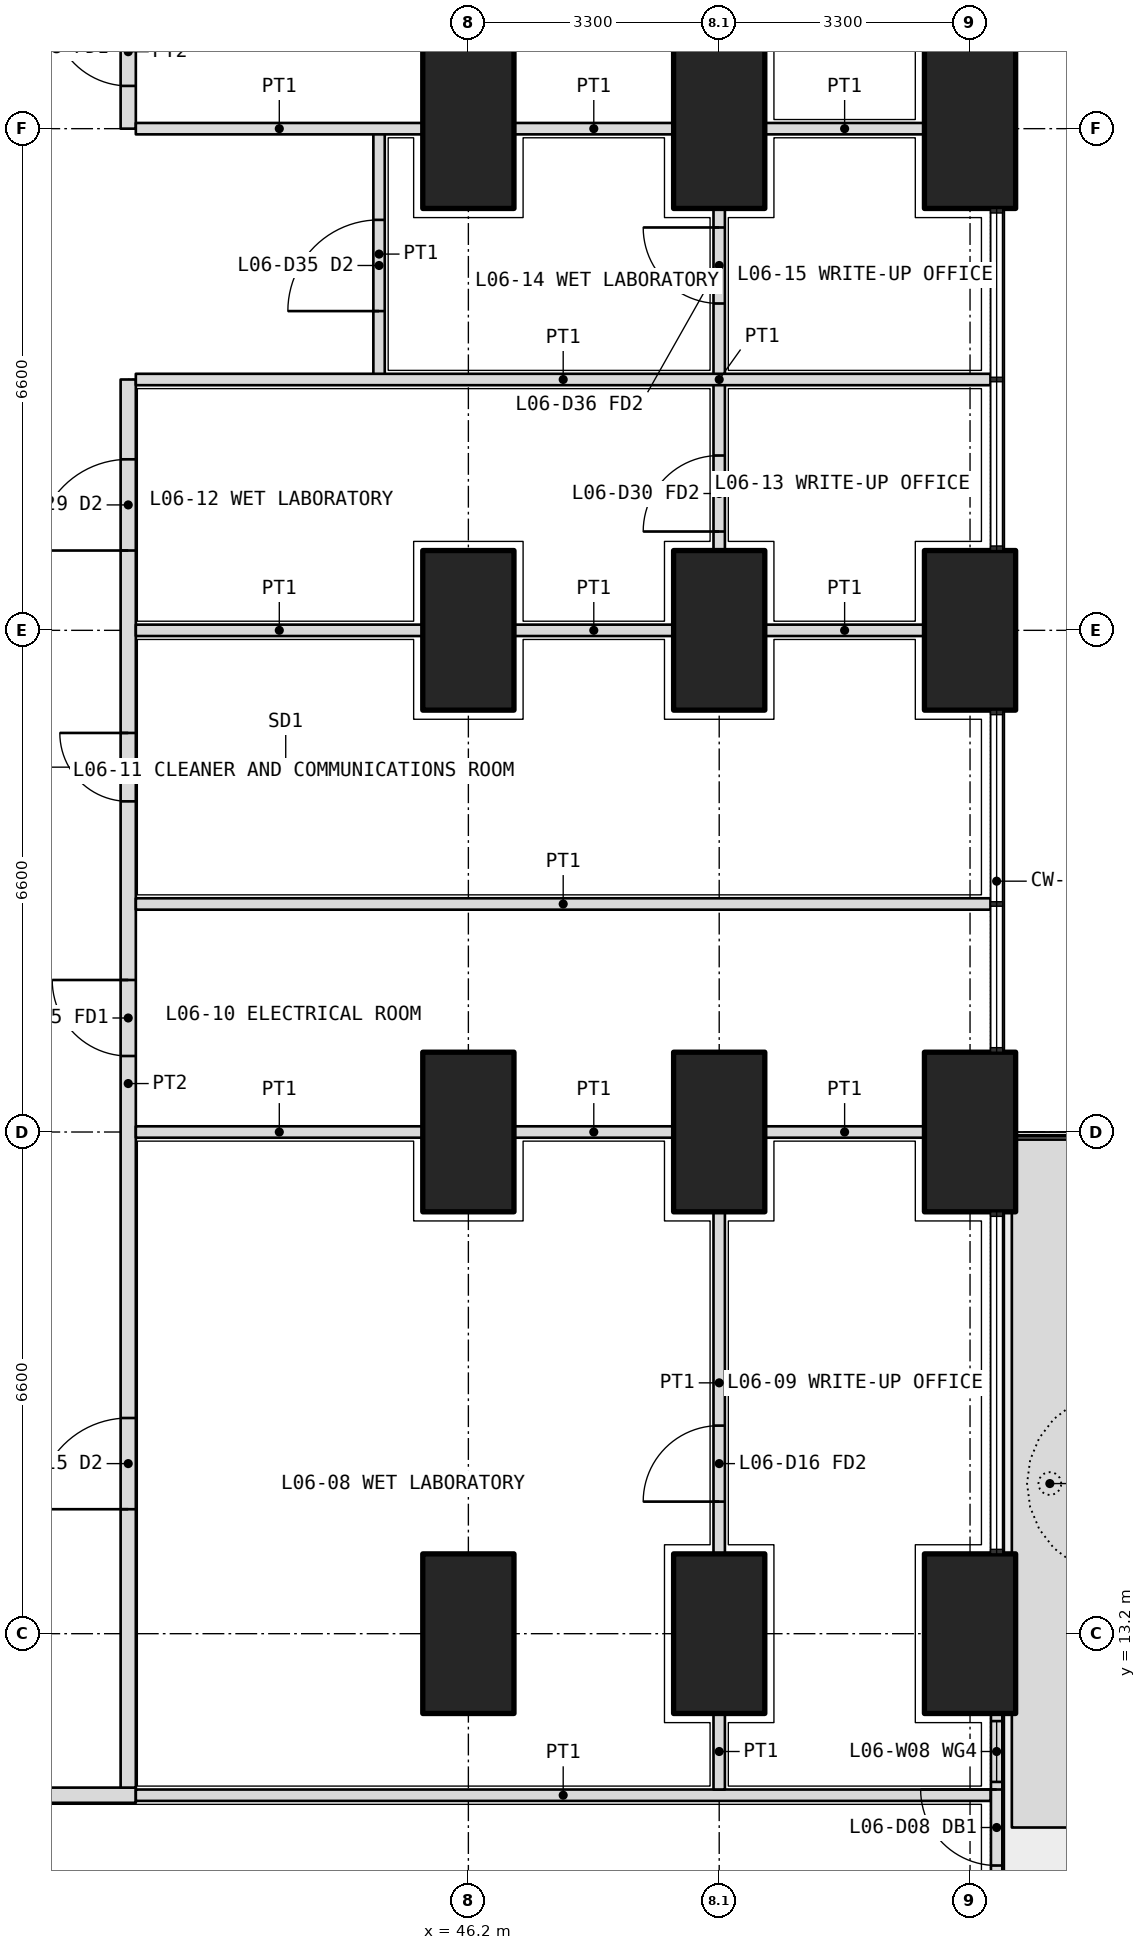
"""IFC4 building model, lengths in metres.
Left out: names, types, materials, properties, quantities, classifications, styles, units other than length and angle.
Written with IfcOpenShell. Run it as: python <this file> out.ifc"""

import sys

from ifc_helpers import new_model, si_unit, direction, frame, frame_2d, origin, origin_2d, place, context, subcontext, project, spatial, polyline, rectangle, outline, extrude, element, fill, save


model = new_model("IFC4")
c1 = context("Model", 3, precision=1e-05, world=origin(), true_north=direction((0.0, 1.0)))
c2 = subcontext(c1, "Body", "Model", "MODEL_VIEW")
j1 = project(units=[si_unit("LENGTHUNIT", "METRE"), si_unit("PLANEANGLEUNIT", "RADIAN")], contexts=[c1])
p1 = place(None, origin())
s1 = spatial("IfcSite", under=j1, at=p1, CompositionType="ELEMENT")
p2 = place(p1, origin())
s2 = spatial("IfcBuilding", under=s1, at=p2, CompositionType="ELEMENT")
p3 = place(p2, frame((0.0, 0.0, 29.7)))
s3 = spatial("IfcBuildingStorey", under=s2, at=p3, CompositionType="ELEMENT", Elevation=29.7)
for number, where, z_axis, x_axis in (
    (1, (52.8, 13.2, 0.0), (0.0, 0.0, 1.0), (0.0, 1.0, 0.0)),
    (2, (52.8, 19.8, 0.0), (0.0, 0.0, 1.0), (0.0, 1.0, 0.0)),
    (3, (52.8, 26.4, 0.0), (0.0, 0.0, 1.0), (0.0, 1.0, 0.0)),
    (4, (52.8, 33.0, 0.0), (0.0, 0.0, 1.0), (0.0, 1.0, 0.0)),
    (5, (49.5, 13.2, 0.0), (0.0, 0.0, 1.0), (0.0, 1.0, 0.0)),
    (6, (49.5, 19.8, 0.0), (0.0, 0.0, 1.0), (0.0, 1.0, 0.0)),
    (7, (49.5, 26.4, 0.0), (0.0, 0.0, 1.0), (0.0, 1.0, 0.0)),
    (8, (49.5, 33.0, 0.0), (0.0, 0.0, 1.0), (0.0, 1.0, 0.0)),
    (9, (46.2, 13.2, 0.0), (0.0, 0.0, 1.0), (0.0, 1.0, 0.0)),
    (10, (46.2, 19.8, 0.0), (0.0, 0.0, 1.0), (0.0, 1.0, 0.0)),
    (11, (46.2, 26.4, 0.0), (0.0, 0.0, 1.0), (0.0, 1.0, 0.0)),
    (12, (46.2, 33.0, 0.0), (0.0, 0.0, 1.0), (0.0, 1.0, 0.0)),
):
    element("IfcColumn", number, at=place(p3, frame(where, z_axis=z_axis, x_axis=x_axis)), inside=s3, PredefinedType="COLUMN", context=c2, shape_type="SweptSolid", body=[
        extrude(rectangle(XDim=2.1, YDim=1.2, at=origin_2d()), origin(), (0.0, 0.0, 1.0), 4.2),
    ])
p4 = place(p3, origin())
e13 = element("IfcWall", 13, at=p4, inside=s3, PredefinedType="USERDEFINED", context=c2, shape_type="SweptSolid", body=[
    extrude(outline(polyline([(53.35, 10.65), (54.35, 10.65), (54.35, 19.7), (53.35, 19.7), (53.35, 10.65)]), holes=[polyline([(53.5, 10.8), (54.2, 10.8), (54.2, 19.55), (53.5, 19.55), (53.5, 10.8)])]), origin(), (0.0, 0.0, 1.0), 1.05),
])
p5 = place(p3, frame((53.15, 7.65, 0.0), z_axis=(0.0, 0.0, 1.0), x_axis=(0.0, 1.0, 0.0)))
e14 = element("IfcWall", 14, at=p5, inside=s3, PredefinedType="SOLIDWALL", context=c2, shape_type="SweptSolid", body=[
    extrude(rectangle(XDim=4.5, YDim=0.15, at=frame_2d((2.25, 0.0))), origin(), (0.0, 0.0, 1.0), 2.7),
])
p6 = place(p5, frame((2.5, 0.0, 0.0)))
e15 = element("IfcOpeningElement", 15, at=p6, cuts=e14, PredefinedType="OPENING", context=c2, shape_type="SweptSolid", body=[
    extrude(rectangle(XDim=1.0, YDim=2.4, at=frame_2d((0.5, 1.2))), frame((0.0, 0.085, 0.0), z_axis=(0.0, -1.0, 0.0), x_axis=(1.0, 0.0, 0.0)), (0.0, 0.0, 1.0), 0.17),
])
p7 = place(p5, frame((0.1, 0.0, 0.1)))
e16 = element("IfcOpeningElement", 16, at=p7, cuts=e14, PredefinedType="OPENING", context=c2, shape_type="SweptSolid", body=[
    extrude(rectangle(XDim=1.9, YDim=2.3, at=frame_2d((0.95, 1.15))), frame((0.0, 0.085, 0.0), z_axis=(0.0, -1.0, 0.0), x_axis=(1.0, 0.0, 0.0)), (0.0, 0.0, 1.0), 0.17),
])
p8 = place(p5, frame((3.6, 0.0, 0.1)))
e17 = element("IfcOpeningElement", 17, at=p8, cuts=e14, PredefinedType="OPENING", context=c2, shape_type="SweptSolid", body=[
    extrude(rectangle(XDim=0.8, YDim=2.3, at=frame_2d((0.4, 1.15))), frame((0.0, 0.085, 0.0), z_axis=(0.0, -1.0, 0.0), x_axis=(1.0, 0.0, 0.0)), (0.0, 0.0, 1.0), 0.17),
])
p9 = place(p3, frame((10.975, 11.075, 0.0), z_axis=(0.0, 0.0, 1.0), x_axis=(1.0, 0.0, 0.0)))
e18 = element("IfcWall", 18, at=p9, inside=s3, PredefinedType="PARTITIONING", context=c2, shape_type="SweptSolid", body=[
    extrude(rectangle(XDim=30.85, YDim=0.2, at=frame_2d((15.425, 0.0))), origin(), (0.0, 0.0, 1.0), 2.85),
])
p10 = place(p9, frame((0.663, 0.0, 0.0)))
e19 = element("IfcOpeningElement", 19, at=p10, cuts=e18, PredefinedType="OPENING", context=c2, shape_type="SweptSolid", body=[
    extrude(rectangle(XDim=1.0, YDim=2.1, at=frame_2d((0.5, 1.05))), frame((0.0, 0.11, 0.0), z_axis=(0.0, -1.0, 0.0), x_axis=(1.0, 0.0, 0.0)), (0.0, 0.0, 1.0), 0.22),
])
p11 = place(p9, frame((8.325, 0.0, 0.0)))
e20 = element("IfcOpeningElement", 20, at=p11, cuts=e18, PredefinedType="OPENING", context=c2, shape_type="SweptSolid", body=[
    extrude(rectangle(XDim=1.0, YDim=2.1, at=frame_2d((0.5, 1.05))), frame((0.0, 0.11, 0.0), z_axis=(0.0, -1.0, 0.0), x_axis=(1.0, 0.0, 0.0)), (0.0, 0.0, 1.0), 0.22),
])
p12 = place(p9, frame((19.875, 0.0, 0.0)))
e21 = element("IfcOpeningElement", 21, at=p12, cuts=e18, PredefinedType="OPENING", context=c2, shape_type="SweptSolid", body=[
    extrude(rectangle(XDim=1.0, YDim=2.1, at=frame_2d((0.5, 1.05))), frame((0.0, 0.11, 0.0), z_axis=(0.0, -1.0, 0.0), x_axis=(1.0, 0.0, 0.0)), (0.0, 0.0, 1.0), 0.22),
])
p13 = place(p9, frame((27.538, 0.0, 0.0)))
e22 = element("IfcOpeningElement", 22, at=p13, cuts=e18, PredefinedType="OPENING", context=c2, shape_type="SweptSolid", body=[
    extrude(rectangle(XDim=1.0, YDim=2.1, at=frame_2d((0.5, 1.05))), frame((0.0, 0.11, 0.0), z_axis=(0.0, -1.0, 0.0), x_axis=(1.0, 0.0, 0.0)), (0.0, 0.0, 1.0), 0.22),
])
p14 = place(p3, frame((41.725, 11.175, 0.0), z_axis=(0.0, 0.0, 1.0), x_axis=(0.0, 1.0, 0.0)))
e23 = element("IfcWall", 23, at=p14, inside=s3, PredefinedType="PARTITIONING", context=c2, shape_type="SweptSolid", body=[
    extrude(rectangle(XDim=18.525, YDim=0.2, at=frame_2d((9.262, 0.0))), origin(), (0.0, 0.0, 1.0), 2.85),
])
p15 = place(p14, frame((3.663, 0.0, 0.0)))
e24 = element("IfcOpeningElement", 24, at=p15, cuts=e23, PredefinedType="OPENING", context=c2, shape_type="SweptSolid", body=[
    extrude(rectangle(XDim=1.2, YDim=2.1, at=frame_2d((0.6, 1.05))), frame((0.0, 0.11, 0.0), z_axis=(0.0, -1.0, 0.0), x_axis=(1.0, 0.0, 0.0)), (0.0, 0.0, 1.0), 0.22),
])
p16 = place(p14, frame((9.625, 0.0, 0.0)))
e25 = element("IfcOpeningElement", 25, at=p16, cuts=e23, PredefinedType="OPENING", context=c2, shape_type="SweptSolid", body=[
    extrude(rectangle(XDim=1.0, YDim=2.1, at=frame_2d((0.5, 1.05))), frame((0.0, 0.11, 0.0), z_axis=(0.0, -1.0, 0.0), x_axis=(1.0, 0.0, 0.0)), (0.0, 0.0, 1.0), 0.22),
])
p17 = place(p14, frame((12.975, 0.0, 0.0)))
e26 = element("IfcOpeningElement", 26, at=p17, cuts=e23, PredefinedType="OPENING", context=c2, shape_type="SweptSolid", body=[
    extrude(rectangle(XDim=0.9, YDim=2.1, at=frame_2d((0.45, 1.05))), frame((0.0, 0.11, 0.0), z_axis=(0.0, -1.0, 0.0), x_axis=(1.0, 0.0, 0.0)), (0.0, 0.0, 1.0), 0.22),
])
p18 = place(p14, frame((16.275, 0.0, 0.0)))
e27 = element("IfcOpeningElement", 27, at=p18, cuts=e23, PredefinedType="OPENING", context=c2, shape_type="SweptSolid", body=[
    extrude(rectangle(XDim=1.2, YDim=2.1, at=frame_2d((0.6, 1.05))), frame((0.0, 0.11, 0.0), z_axis=(0.0, -1.0, 0.0), x_axis=(1.0, 0.0, 0.0)), (0.0, 0.0, 1.0), 0.22),
])
p19 = place(p3, frame((41.725, 33.0, 0.0), z_axis=(0.0, 0.0, 1.0), x_axis=(0.0, 1.0, 0.0)))
e28 = element("IfcWall", 28, at=p19, inside=s3, PredefinedType="PARTITIONING", context=c2, shape_type="SweptSolid", body=[
    extrude(rectangle(XDim=2.025, YDim=0.2, at=frame_2d((1.012, 0.0))), origin(), (0.0, 0.0, 1.0), 2.85),
])
p20 = place(p19, frame((0.562, 0.0, 0.0)))
e29 = element("IfcOpeningElement", 29, at=p20, cuts=e28, PredefinedType="OPENING", context=c2, shape_type="SweptSolid", body=[
    extrude(rectangle(XDim=1.0, YDim=2.1, at=frame_2d((0.5, 1.05))), frame((0.0, 0.11, 0.0), z_axis=(0.0, -1.0, 0.0), x_axis=(1.0, 0.0, 0.0)), (0.0, 0.0, 1.0), 0.22),
])
p21 = place(p3, frame((53.07, 11.075, 0.0), z_axis=(0.0, 0.0, 1.0), x_axis=(-1.0, 0.0, 0.0)))
e30 = element("IfcWall", 30, at=p21, inside=s3, PredefinedType="PARTITIONING", context=c2, shape_type="SweptSolid", body=[
    extrude(rectangle(XDim=11.245, YDim=0.15, at=frame_2d((5.623, 0.0))), origin(), (0.0, 0.0, 1.0), 2.7),
])
p22 = place(p3, frame((49.5, 11.15, 0.0), z_axis=(0.0, 0.0, 1.0), x_axis=(0.0, 1.0, 0.0)))
e31 = element("IfcWall", 31, at=p22, inside=s3, PredefinedType="PARTITIONING", context=c2, shape_type="SweptSolid", body=[
    extrude(rectangle(XDim=1.0, YDim=0.15, at=frame_2d((0.5, 0.0))), origin(), (0.0, 0.0, 1.0), 3.9),
])
p23 = place(p3, frame((49.5, 14.25, 0.0), z_axis=(0.0, 0.0, 1.0), x_axis=(0.0, 1.0, 0.0)))
e32 = element("IfcWall", 32, at=p23, inside=s3, PredefinedType="PARTITIONING", context=c2, shape_type="SweptSolid", body=[
    extrude(rectangle(XDim=4.5, YDim=0.15, at=frame_2d((2.25, 0.0))), origin(), (0.0, 0.0, 1.0), 3.9),
])
p24 = place(p23, frame((0.688, 0.0, 0.0)))
e33 = element("IfcOpeningElement", 33, at=p24, cuts=e32, PredefinedType="OPENING", context=c2, shape_type="SweptSolid", body=[
    extrude(rectangle(XDim=1.0, YDim=2.1, at=frame_2d((0.5, 1.05))), frame((0.0, 0.085, 0.0), z_axis=(0.0, -1.0, 0.0), x_axis=(1.0, 0.0, 0.0)), (0.0, 0.0, 1.0), 0.17),
])
p25 = place(p3, frame((49.5, 27.45, 0.0), z_axis=(0.0, 0.0, 1.0), x_axis=(0.0, 1.0, 0.0)))
e34 = element("IfcWall", 34, at=p25, inside=s3, PredefinedType="PARTITIONING", context=c2, shape_type="SweptSolid", body=[
    extrude(rectangle(XDim=4.5, YDim=0.15, at=frame_2d((2.25, 0.0))), origin(), (0.0, 0.0, 1.0), 3.9),
])
p26 = place(p25, frame((0.25, 0.0, 0.0)))
e35 = element("IfcOpeningElement", 35, at=p26, cuts=e34, PredefinedType="OPENING", context=c2, shape_type="SweptSolid", body=[
    extrude(rectangle(XDim=1.0, YDim=2.1, at=frame_2d((0.5, 1.05))), frame((0.0, 0.085, 0.0), z_axis=(0.0, -1.0, 0.0), x_axis=(1.0, 0.0, 0.0)), (0.0, 0.0, 1.0), 0.17),
])
p27 = place(p25, frame((3.25, 0.0, 0.0)))
e36 = element("IfcOpeningElement", 36, at=p27, cuts=e34, PredefinedType="OPENING", context=c2, shape_type="SweptSolid", body=[
    extrude(rectangle(XDim=1.0, YDim=2.1, at=frame_2d((0.5, 1.05))), frame((0.0, 0.085, 0.0), z_axis=(0.0, -1.0, 0.0), x_axis=(1.0, 0.0, 0.0)), (0.0, 0.0, 1.0), 0.17),
])
p28 = place(p3, frame((53.07, 22.8, 0.0), z_axis=(0.0, 0.0, 1.0), x_axis=(-1.0, 0.0, 0.0)))
e37 = element("IfcWall", 37, at=p28, inside=s3, PredefinedType="PARTITIONING", context=c2, shape_type="SweptSolid", body=[
    extrude(rectangle(XDim=11.245, YDim=0.15, at=frame_2d((5.623, 0.0))), origin(), (0.0, 0.0, 1.0), 2.7),
])
for number, where, z_axis, x_axis in (
    (38, (52.2, 26.4, 0.0), (0.0, 0.0, 1.0), (-1.0, 0.0, 0.0)),
    (39, (48.9, 26.4, 0.0), (0.0, 0.0, 1.0), (-1.0, 0.0, 0.0)),
):
    element("IfcWall", number, at=place(p3, frame(where, z_axis=z_axis, x_axis=x_axis)), inside=s3, PredefinedType="PARTITIONING", context=c2, shape_type="SweptSolid", body=[
        extrude(rectangle(XDim=2.1, YDim=0.15, at=frame_2d((1.05, 0.0))), origin(), (0.0, 0.0, 1.0), 2.85),
    ])
p29 = place(p3, frame((45.6, 26.4, 0.0), z_axis=(0.0, 0.0, 1.0), x_axis=(-1.0, 0.0, 0.0)))
e40 = element("IfcWall", 40, at=p29, inside=s3, PredefinedType="PARTITIONING", context=c2, shape_type="SweptSolid", body=[
    extrude(rectangle(XDim=3.775, YDim=0.15, at=frame_2d((1.888, 0.0))), origin(), (0.0, 0.0, 1.0), 2.85),
])
p30 = place(p3, frame((45.025, 29.7, 0.0), z_axis=(0.0, 0.0, 1.0), x_axis=(0.0, 1.0, 0.0)))
e41 = element("IfcWall", 41, at=p30, inside=s3, PredefinedType="PARTITIONING", context=c2, shape_type="SweptSolid", body=[
    extrude(rectangle(XDim=3.3, YDim=0.15, at=frame_2d((1.65, 0.0))), origin(), (0.0, 0.0, 1.0), 2.85),
])
p31 = place(p30, frame((0.9, 0.0, 0.0)))
e42 = element("IfcOpeningElement", 42, at=p31, cuts=e41, PredefinedType="OPENING", context=c2, shape_type="SweptSolid", body=[
    extrude(rectangle(XDim=1.2, YDim=2.1, at=frame_2d((0.6, 1.05))), frame((0.0, 0.085, 0.0), z_axis=(0.0, -1.0, 0.0), x_axis=(1.0, 0.0, 0.0)), (0.0, 0.0, 1.0), 0.17),
])
for number, where, z_axis, x_axis in (
    (43, (52.2, 19.8, 0.0), (0.0, 0.0, 1.0), (-1.0, 0.0, 0.0)),
    (44, (48.9, 19.8, 0.0), (0.0, 0.0, 1.0), (-1.0, 0.0, 0.0)),
):
    element("IfcWall", number, at=place(p3, frame(where, z_axis=z_axis, x_axis=x_axis)), inside=s3, PredefinedType="PARTITIONING", context=c2, shape_type="SweptSolid", body=[
        extrude(rectangle(XDim=2.1, YDim=0.15, at=frame_2d((1.05, 0.0))), origin(), (0.0, 0.0, 1.0), 2.85),
    ])
p32 = place(p3, frame((45.6, 19.8, 0.0), z_axis=(0.0, 0.0, 1.0), x_axis=(-1.0, 0.0, 0.0)))
e45 = element("IfcWall", 45, at=p32, inside=s3, PredefinedType="PARTITIONING", context=c2, shape_type="SweptSolid", body=[
    extrude(rectangle(XDim=3.775, YDim=0.15, at=frame_2d((1.888, 0.0))), origin(), (0.0, 0.0, 1.0), 2.85),
])
p33 = place(p3, frame((53.07, 29.7, 0.0), z_axis=(0.0, 0.0, 1.0), x_axis=(-1.0, 0.0, 0.0)))
e46 = element("IfcWall", 46, at=p33, inside=s3, PredefinedType="PARTITIONING", context=c2, shape_type="SweptSolid", body=[
    extrude(rectangle(XDim=11.245, YDim=0.15, at=frame_2d((5.623, 0.0))), origin(), (0.0, 0.0, 1.0), 2.7),
])
for number, where, z_axis, x_axis in (
    (47, (52.2, 33.0, 0.0), (0.0, 0.0, 1.0), (-1.0, 0.0, 0.0)),
    (48, (48.9, 33.0, 0.0), (0.0, 0.0, 1.0), (-1.0, 0.0, 0.0)),
):
    element("IfcWall", number, at=place(p3, frame(where, z_axis=z_axis, x_axis=x_axis)), inside=s3, PredefinedType="PARTITIONING", context=c2, shape_type="SweptSolid", body=[
        extrude(rectangle(XDim=2.1, YDim=0.15, at=frame_2d((1.05, 0.0))), origin(), (0.0, 0.0, 1.0), 2.85),
    ])
p34 = place(p3, frame((45.6, 33.0, 0.0), z_axis=(0.0, 0.0, 1.0), x_axis=(-1.0, 0.0, 0.0)))
e49 = element("IfcWall", 49, at=p34, inside=s3, PredefinedType="PARTITIONING", context=c2, shape_type="SweptSolid", body=[
    extrude(rectangle(XDim=3.775, YDim=0.15, at=frame_2d((1.888, 0.0))), origin(), (0.0, 0.0, 1.0), 2.85),
])
p35 = place(p6, origin())
e50 = element("IfcDoor", 50, at=p35, inside=s3, OperationType="SINGLE_SWING_RIGHT", PredefinedType="DOOR", context=c2, shape_type="SweptSolid", body=[
    extrude(rectangle(XDim=1.0, YDim=2.4, at=frame_2d((0.5, 1.2))), frame((0.0, 0.025, 0.0), z_axis=(0.0, -1.0, 0.0), x_axis=(1.0, 0.0, 0.0)), (0.0, 0.0, 1.0), 0.05),
])
fill(e15, e50)
p36 = place(p8, origin())
e51 = element("IfcWindow", 51, at=p36, inside=s3, PartitioningType="SINGLE_PANEL", PredefinedType="WINDOW", context=c2, shape_type="SweptSolid", body=[
    extrude(rectangle(XDim=0.8, YDim=2.3, at=frame_2d((0.4, 1.15))), frame((0.0, 0.03, 0.0), z_axis=(0.0, -1.0, 0.0), x_axis=(1.0, 0.0, 0.0)), (0.0, 0.0, 1.0), 0.06),
])
fill(e17, e51)
p37 = place(p15, origin())
e52 = element("IfcDoor", 52, at=p37, inside=s3, OperationType="DOUBLE_DOOR_SINGLE_SWING", PredefinedType="DOOR", context=c2, shape_type="SweptSolid", body=[
    extrude(rectangle(XDim=1.2, YDim=2.1, at=frame_2d((0.6, 1.05))), frame((0.0, 0.025, 0.0), z_axis=(0.0, -1.0, 0.0), x_axis=(1.0, 0.0, 0.0)), (0.0, 0.0, 1.0), 0.05),
])
fill(e24, e52)
p38 = place(p24, origin())
e53 = element("IfcDoor", 53, at=p38, inside=s3, OperationType="SINGLE_SWING_LEFT", PredefinedType="DOOR", context=c2, shape_type="SweptSolid", body=[
    extrude(rectangle(XDim=1.0, YDim=2.1, at=frame_2d((0.5, 1.05))), frame((0.0, 0.025, 0.0), z_axis=(0.0, -1.0, 0.0), x_axis=(1.0, 0.0, 0.0)), (0.0, 0.0, 1.0), 0.05),
])
fill(e33, e53)
p39 = place(p16, origin())
e54 = element("IfcDoor", 54, at=p39, inside=s3, OperationType="SINGLE_SWING_RIGHT", PredefinedType="DOOR", context=c2, shape_type="SweptSolid", body=[
    extrude(rectangle(XDim=1.0, YDim=2.1, at=frame_2d((0.5, 1.05))), frame((0.0, 0.025, 0.0), z_axis=(0.0, -1.0, 0.0), x_axis=(1.0, 0.0, 0.0)), (0.0, 0.0, 1.0), 0.05),
])
fill(e25, e54)
p40 = place(p17, origin())
e55 = element("IfcDoor", 55, at=p40, inside=s3, OperationType="SINGLE_SWING_RIGHT", PredefinedType="DOOR", context=c2, shape_type="SweptSolid", body=[
    extrude(rectangle(XDim=0.9, YDim=2.1, at=frame_2d((0.45, 1.05))), frame((0.0, 0.025, 0.0), z_axis=(0.0, -1.0, 0.0), x_axis=(1.0, 0.0, 0.0)), (0.0, 0.0, 1.0), 0.05),
])
fill(e26, e55)
p41 = place(p18, origin())
e56 = element("IfcDoor", 56, at=p41, inside=s3, OperationType="DOUBLE_DOOR_SINGLE_SWING", PredefinedType="DOOR", context=c2, shape_type="SweptSolid", body=[
    extrude(rectangle(XDim=1.2, YDim=2.1, at=frame_2d((0.6, 1.05))), frame((0.0, 0.025, 0.0), z_axis=(0.0, -1.0, 0.0), x_axis=(1.0, 0.0, 0.0)), (0.0, 0.0, 1.0), 0.05),
])
fill(e27, e56)
p42 = place(p26, origin())
e57 = element("IfcDoor", 57, at=p42, inside=s3, OperationType="SINGLE_SWING_LEFT", PredefinedType="DOOR", context=c2, shape_type="SweptSolid", body=[
    extrude(rectangle(XDim=1.0, YDim=2.1, at=frame_2d((0.5, 1.05))), frame((0.0, 0.025, 0.0), z_axis=(0.0, -1.0, 0.0), x_axis=(1.0, 0.0, 0.0)), (0.0, 0.0, 1.0), 0.05),
])
fill(e35, e57)
p43 = place(p31, origin())
e58 = element("IfcDoor", 58, at=p43, inside=s3, OperationType="DOUBLE_DOOR_SINGLE_SWING", PredefinedType="DOOR", context=c2, shape_type="SweptSolid", body=[
    extrude(rectangle(XDim=1.2, YDim=2.1, at=frame_2d((0.6, 1.05))), frame((0.0, 0.025, 0.0), z_axis=(0.0, -1.0, 0.0), x_axis=(1.0, 0.0, 0.0)), (0.0, 0.0, 1.0), 0.05),
])
fill(e42, e58)
p44 = place(p27, origin())
e59 = element("IfcDoor", 59, at=p44, inside=s3, OperationType="SINGLE_SWING_RIGHT", PredefinedType="DOOR", context=c2, shape_type="SweptSolid", body=[
    extrude(rectangle(XDim=1.0, YDim=2.1, at=frame_2d((0.5, 1.05))), frame((0.0, 0.025, 0.0), z_axis=(0.0, -1.0, 0.0), x_axis=(1.0, 0.0, 0.0)), (0.0, 0.0, 1.0), 0.05),
])
fill(e36, e59)
p45 = place(p20, origin())
e60 = element("IfcDoor", 60, at=p45, inside=s3, OperationType="SINGLE_SWING_RIGHT", PredefinedType="DOOR", context=c2, shape_type="SweptSolid", body=[
    extrude(rectangle(XDim=1.0, YDim=2.1, at=frame_2d((0.5, 1.05))), frame((0.0, 0.025, 0.0), z_axis=(0.0, -1.0, 0.0), x_axis=(1.0, 0.0, 0.0)), (0.0, 0.0, 1.0), 0.05),
])
fill(e29, e60)
save(model, sys.argv[1])
